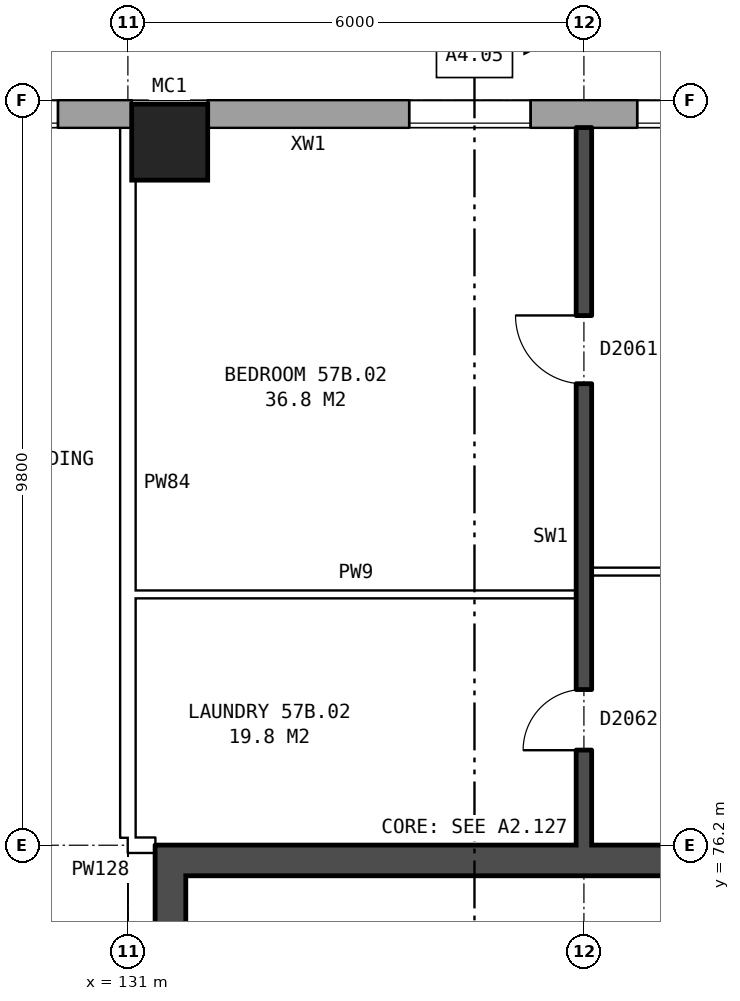
"""IFC4 building model, lengths in metres.
Left out: names, types, materials, properties, quantities, classifications, styles, units other than length and angle.
Written with IfcOpenShell. Run it as: python <this file> out.ifc"""

import sys

from ifc_helpers import new_model, si_unit, direction, frame, frame_2d, origin, origin_2d, place, context, subcontext, project, spatial, rectangle, hollow_rectangle, extrude, element, fill, save


model = new_model("IFC4")
c1 = context("Model", 3, precision=1e-05, world=origin(), true_north=direction((0.0, 1.0)))
c2 = subcontext(c1, "Body", "Model", "MODEL_VIEW")
j1 = project(units=[si_unit("LENGTHUNIT", "METRE"), si_unit("PLANEANGLEUNIT", "RADIAN")], contexts=[c1])
p1 = place(None, origin())
s1 = spatial("IfcSite", under=j1, at=p1, CompositionType="ELEMENT")
p2 = place(p1, origin())
s2 = spatial("IfcBuilding", under=s1, at=p2, CompositionType="ELEMENT")
p3 = place(p2, frame((0.0, 0.0, 202.8)))
s3 = spatial("IfcBuildingStorey", under=s2, at=p3, CompositionType="ELEMENT", Elevation=202.8)
p4 = place(p3, frame((131.55, 85.45, 0.0), z_axis=(0.0, 0.0, 1.0), x_axis=(1.0, 0.0, 0.0)))
e1 = element("IfcColumn", 1, at=p4, inside=s3, PredefinedType="COLUMN", context=c2, shape_type="SweptSolid", body=[
    extrude(hollow_rectangle(XDim=1.0, YDim=1.0, WallThickness=0.055, at=origin_2d()), origin(), (0.0, 0.0, 1.0), 3.1),
])
p5 = place(p3, frame((165.925, 85.82, 0.0), z_axis=(0.0, 0.0, 1.0), x_axis=(-1.0, 0.0, 0.0)))
e2 = element("IfcWall", 2, at=p5, inside=s3, PredefinedType="STANDARD", context=c2, shape_type="SweptSolid", body=[
    extrude(rectangle(XDim=33.875, YDim=0.36, at=frame_2d((16.938, 0.0))), origin(), (0.0, 0.0, 1.0), 2.85),
])
p6 = place(p5, frame((2.625, 0.0, 0.8)))
e3 = element("IfcOpeningElement", 3, at=p6, cuts=e2, PredefinedType="OPENING", context=c2, shape_type="SweptSolid", body=[
    extrude(rectangle(XDim=1.6, YDim=1.8, at=frame_2d((0.8, 0.9))), frame((0.0, 0.19, 0.0), z_axis=(0.0, -1.0, 0.0), x_axis=(1.0, 0.0, 0.0)), (0.0, 0.0, 1.0), 0.38),
])
p7 = place(p5, frame((5.625, 0.0, 0.8)))
e4 = element("IfcOpeningElement", 4, at=p7, cuts=e2, PredefinedType="OPENING", context=c2, shape_type="SweptSolid", body=[
    extrude(rectangle(XDim=1.6, YDim=1.8, at=frame_2d((0.8, 0.9))), frame((0.0, 0.19, 0.0), z_axis=(0.0, -1.0, 0.0), x_axis=(1.0, 0.0, 0.0)), (0.0, 0.0, 1.0), 0.38),
])
p8 = place(p5, frame((8.625, 0.0, 0.8)))
e5 = element("IfcOpeningElement", 5, at=p8, cuts=e2, PredefinedType="OPENING", context=c2, shape_type="SweptSolid", body=[
    extrude(rectangle(XDim=1.6, YDim=1.8, at=frame_2d((0.8, 0.9))), frame((0.0, 0.19, 0.0), z_axis=(0.0, -1.0, 0.0), x_axis=(1.0, 0.0, 0.0)), (0.0, 0.0, 1.0), 0.38),
])
p9 = place(p5, frame((11.625, 0.0, 0.8)))
e6 = element("IfcOpeningElement", 6, at=p9, cuts=e2, PredefinedType="OPENING", context=c2, shape_type="SweptSolid", body=[
    extrude(rectangle(XDim=1.6, YDim=1.8, at=frame_2d((0.8, 0.9))), frame((0.0, 0.19, 0.0), z_axis=(0.0, -1.0, 0.0), x_axis=(1.0, 0.0, 0.0)), (0.0, 0.0, 1.0), 0.38),
])
p10 = place(p5, frame((14.625, 0.0, 0.8)))
e7 = element("IfcOpeningElement", 7, at=p10, cuts=e2, PredefinedType="OPENING", context=c2, shape_type="SweptSolid", body=[
    extrude(rectangle(XDim=1.6, YDim=1.8, at=frame_2d((0.8, 0.9))), frame((0.0, 0.19, 0.0), z_axis=(0.0, -1.0, 0.0), x_axis=(1.0, 0.0, 0.0)), (0.0, 0.0, 1.0), 0.38),
])
p11 = place(p5, frame((17.625, 0.0, 0.8)))
e8 = element("IfcOpeningElement", 8, at=p11, cuts=e2, PredefinedType="OPENING", context=c2, shape_type="SweptSolid", body=[
    extrude(rectangle(XDim=1.6, YDim=1.8, at=frame_2d((0.8, 0.9))), frame((0.0, 0.19, 0.0), z_axis=(0.0, -1.0, 0.0), x_axis=(1.0, 0.0, 0.0)), (0.0, 0.0, 1.0), 0.38),
])
p12 = place(p5, frame((20.625, 0.0, 0.8)))
e9 = element("IfcOpeningElement", 9, at=p12, cuts=e2, PredefinedType="OPENING", context=c2, shape_type="SweptSolid", body=[
    extrude(rectangle(XDim=1.6, YDim=1.8, at=frame_2d((0.8, 0.9))), frame((0.0, 0.19, 0.0), z_axis=(0.0, -1.0, 0.0), x_axis=(1.0, 0.0, 0.0)), (0.0, 0.0, 1.0), 0.38),
])
p13 = place(p5, frame((23.625, 0.0, 0.8)))
e10 = element("IfcOpeningElement", 10, at=p13, cuts=e2, PredefinedType="OPENING", context=c2, shape_type="SweptSolid", body=[
    extrude(rectangle(XDim=1.6, YDim=1.8, at=frame_2d((0.8, 0.9))), frame((0.0, 0.19, 0.0), z_axis=(0.0, -1.0, 0.0), x_axis=(1.0, 0.0, 0.0)), (0.0, 0.0, 1.0), 0.38),
])
p14 = place(p5, frame((26.625, 0.0, 0.8)))
e11 = element("IfcOpeningElement", 11, at=p14, cuts=e2, PredefinedType="OPENING", context=c2, shape_type="SweptSolid", body=[
    extrude(rectangle(XDim=1.6, YDim=1.8, at=frame_2d((0.8, 0.9))), frame((0.0, 0.19, 0.0), z_axis=(0.0, -1.0, 0.0), x_axis=(1.0, 0.0, 0.0)), (0.0, 0.0, 1.0), 0.38),
])
p15 = place(p5, frame((29.625, 0.0, 0.8)))
e12 = element("IfcOpeningElement", 12, at=p15, cuts=e2, PredefinedType="OPENING", context=c2, shape_type="SweptSolid", body=[
    extrude(rectangle(XDim=1.6, YDim=1.8, at=frame_2d((0.8, 0.9))), frame((0.0, 0.19, 0.0), z_axis=(0.0, -1.0, 0.0), x_axis=(1.0, 0.0, 0.0)), (0.0, 0.0, 1.0), 0.38),
])
p16 = place(p3, frame((131.05, 85.82, 0.0), z_axis=(0.0, 0.0, 1.0), x_axis=(-1.0, 0.0, 0.0)))
e13 = element("IfcWall", 13, at=p16, inside=s3, PredefinedType="STANDARD", context=c2, shape_type="SweptSolid", body=[
    extrude(rectangle(XDim=55.1, YDim=0.36, at=frame_2d((27.55, 0.0))), origin(), (0.0, 0.0, 1.0), 2.85),
])
p17 = place(p16, frame((0.969, 0.0, 0.8)))
e14 = element("IfcOpeningElement", 14, at=p17, cuts=e13, PredefinedType="OPENING", context=c2, shape_type="SweptSolid", body=[
    extrude(rectangle(XDim=1.6, YDim=1.8, at=frame_2d((0.8, 0.9))), frame((0.0, 0.19, 0.0), z_axis=(0.0, -1.0, 0.0), x_axis=(1.0, 0.0, 0.0)), (0.0, 0.0, 1.0), 0.38),
])
p18 = place(p16, frame((4.406, 0.0, 0.8)))
e15 = element("IfcOpeningElement", 15, at=p18, cuts=e13, PredefinedType="OPENING", context=c2, shape_type="SweptSolid", body=[
    extrude(rectangle(XDim=1.6, YDim=1.8, at=frame_2d((0.8, 0.9))), frame((0.0, 0.19, 0.0), z_axis=(0.0, -1.0, 0.0), x_axis=(1.0, 0.0, 0.0)), (0.0, 0.0, 1.0), 0.38),
])
p19 = place(p16, frame((7.844, 0.0, 0.8)))
e16 = element("IfcOpeningElement", 16, at=p19, cuts=e13, PredefinedType="OPENING", context=c2, shape_type="SweptSolid", body=[
    extrude(rectangle(XDim=1.6, YDim=1.8, at=frame_2d((0.8, 0.9))), frame((0.0, 0.19, 0.0), z_axis=(0.0, -1.0, 0.0), x_axis=(1.0, 0.0, 0.0)), (0.0, 0.0, 1.0), 0.38),
])
p20 = place(p16, frame((11.281, 0.0, 0.8)))
e17 = element("IfcOpeningElement", 17, at=p20, cuts=e13, PredefinedType="OPENING", context=c2, shape_type="SweptSolid", body=[
    extrude(rectangle(XDim=1.6, YDim=1.8, at=frame_2d((0.8, 0.9))), frame((0.0, 0.19, 0.0), z_axis=(0.0, -1.0, 0.0), x_axis=(1.0, 0.0, 0.0)), (0.0, 0.0, 1.0), 0.38),
])
p21 = place(p16, frame((14.719, 0.0, 0.8)))
e18 = element("IfcOpeningElement", 18, at=p21, cuts=e13, PredefinedType="OPENING", context=c2, shape_type="SweptSolid", body=[
    extrude(rectangle(XDim=1.6, YDim=1.8, at=frame_2d((0.8, 0.9))), frame((0.0, 0.19, 0.0), z_axis=(0.0, -1.0, 0.0), x_axis=(1.0, 0.0, 0.0)), (0.0, 0.0, 1.0), 0.38),
])
p22 = place(p16, frame((18.156, 0.0, 0.8)))
e19 = element("IfcOpeningElement", 19, at=p22, cuts=e13, PredefinedType="OPENING", context=c2, shape_type="SweptSolid", body=[
    extrude(rectangle(XDim=1.6, YDim=1.8, at=frame_2d((0.8, 0.9))), frame((0.0, 0.19, 0.0), z_axis=(0.0, -1.0, 0.0), x_axis=(1.0, 0.0, 0.0)), (0.0, 0.0, 1.0), 0.38),
])
p23 = place(p16, frame((21.594, 0.0, 0.8)))
e20 = element("IfcOpeningElement", 20, at=p23, cuts=e13, PredefinedType="OPENING", context=c2, shape_type="SweptSolid", body=[
    extrude(rectangle(XDim=1.6, YDim=1.8, at=frame_2d((0.8, 0.9))), frame((0.0, 0.19, 0.0), z_axis=(0.0, -1.0, 0.0), x_axis=(1.0, 0.0, 0.0)), (0.0, 0.0, 1.0), 0.38),
])
p24 = place(p16, frame((25.031, 0.0, 0.8)))
e21 = element("IfcOpeningElement", 21, at=p24, cuts=e13, PredefinedType="OPENING", context=c2, shape_type="SweptSolid", body=[
    extrude(rectangle(XDim=1.6, YDim=1.8, at=frame_2d((0.8, 0.9))), frame((0.0, 0.19, 0.0), z_axis=(0.0, -1.0, 0.0), x_axis=(1.0, 0.0, 0.0)), (0.0, 0.0, 1.0), 0.38),
])
p25 = place(p16, frame((28.469, 0.0, 0.8)))
e22 = element("IfcOpeningElement", 22, at=p25, cuts=e13, PredefinedType="OPENING", context=c2, shape_type="SweptSolid", body=[
    extrude(rectangle(XDim=1.6, YDim=1.8, at=frame_2d((0.8, 0.9))), frame((0.0, 0.19, 0.0), z_axis=(0.0, -1.0, 0.0), x_axis=(1.0, 0.0, 0.0)), (0.0, 0.0, 1.0), 0.38),
])
p26 = place(p16, frame((31.906, 0.0, 0.8)))
e23 = element("IfcOpeningElement", 23, at=p26, cuts=e13, PredefinedType="OPENING", context=c2, shape_type="SweptSolid", body=[
    extrude(rectangle(XDim=1.6, YDim=1.8, at=frame_2d((0.8, 0.9))), frame((0.0, 0.19, 0.0), z_axis=(0.0, -1.0, 0.0), x_axis=(1.0, 0.0, 0.0)), (0.0, 0.0, 1.0), 0.38),
])
p27 = place(p16, frame((35.344, 0.0, 0.8)))
e24 = element("IfcOpeningElement", 24, at=p27, cuts=e13, PredefinedType="OPENING", context=c2, shape_type="SweptSolid", body=[
    extrude(rectangle(XDim=1.6, YDim=1.8, at=frame_2d((0.8, 0.9))), frame((0.0, 0.19, 0.0), z_axis=(0.0, -1.0, 0.0), x_axis=(1.0, 0.0, 0.0)), (0.0, 0.0, 1.0), 0.38),
])
p28 = place(p16, frame((38.781, 0.0, 0.8)))
e25 = element("IfcOpeningElement", 25, at=p28, cuts=e13, PredefinedType="OPENING", context=c2, shape_type="SweptSolid", body=[
    extrude(rectangle(XDim=1.6, YDim=1.8, at=frame_2d((0.8, 0.9))), frame((0.0, 0.19, 0.0), z_axis=(0.0, -1.0, 0.0), x_axis=(1.0, 0.0, 0.0)), (0.0, 0.0, 1.0), 0.38),
])
p29 = place(p16, frame((42.219, 0.0, 0.8)))
e26 = element("IfcOpeningElement", 26, at=p29, cuts=e13, PredefinedType="OPENING", context=c2, shape_type="SweptSolid", body=[
    extrude(rectangle(XDim=1.6, YDim=1.8, at=frame_2d((0.8, 0.9))), frame((0.0, 0.19, 0.0), z_axis=(0.0, -1.0, 0.0), x_axis=(1.0, 0.0, 0.0)), (0.0, 0.0, 1.0), 0.38),
])
p30 = place(p16, frame((45.656, 0.0, 0.8)))
e27 = element("IfcOpeningElement", 27, at=p30, cuts=e13, PredefinedType="OPENING", context=c2, shape_type="SweptSolid", body=[
    extrude(rectangle(XDim=1.6, YDim=1.8, at=frame_2d((0.8, 0.9))), frame((0.0, 0.19, 0.0), z_axis=(0.0, -1.0, 0.0), x_axis=(1.0, 0.0, 0.0)), (0.0, 0.0, 1.0), 0.38),
])
p31 = place(p16, frame((49.094, 0.0, 0.8)))
e28 = element("IfcOpeningElement", 28, at=p31, cuts=e13, PredefinedType="OPENING", context=c2, shape_type="SweptSolid", body=[
    extrude(rectangle(XDim=1.6, YDim=1.8, at=frame_2d((0.8, 0.9))), frame((0.0, 0.19, 0.0), z_axis=(0.0, -1.0, 0.0), x_axis=(1.0, 0.0, 0.0)), (0.0, 0.0, 1.0), 0.38),
])
p32 = place(p16, frame((52.531, 0.0, 0.8)))
e29 = element("IfcOpeningElement", 29, at=p32, cuts=e13, PredefinedType="OPENING", context=c2, shape_type="SweptSolid", body=[
    extrude(rectangle(XDim=1.6, YDim=1.8, at=frame_2d((0.8, 0.9))), frame((0.0, 0.19, 0.0), z_axis=(0.0, -1.0, 0.0), x_axis=(1.0, 0.0, 0.0)), (0.0, 0.0, 1.0), 0.38),
])
p33 = place(p3, frame((131.56, 63.8, 0.0), z_axis=(0.0, 0.0, 1.0), x_axis=(0.0, 1.0, 0.0)))
e30 = element("IfcWall", 30, at=p33, inside=s3, PredefinedType="SHEAR", context=c2, shape_type="SweptSolid", body=[
    extrude(rectangle(XDim=12.4, YDim=0.4, at=frame_2d((6.2, 0.0))), origin(), (0.0, 0.0, 1.0), 2.85),
])
p34 = place(p33, frame((9.8, 0.0, 0.0)))
e31 = element("IfcOpeningElement", 31, at=p34, cuts=e30, PredefinedType="OPENING", context=c2, shape_type="SweptSolid", body=[
    extrude(rectangle(XDim=1.1, YDim=2.1, at=frame_2d((0.55, 1.05))), frame((0.0, 0.21, 0.0), z_axis=(0.0, -1.0, 0.0), x_axis=(1.0, 0.0, 0.0)), (0.0, 0.0, 1.0), 0.42),
])
p35 = place(p3, frame((139.36, 76.0, 0.0), z_axis=(0.0, 0.0, 1.0), x_axis=(-1.0, 0.0, 0.0)))
e32 = element("IfcWall", 32, at=p35, inside=s3, PredefinedType="SHEAR", context=c2, shape_type="SweptSolid", body=[
    extrude(rectangle(XDim=7.6, YDim=0.4, at=frame_2d((3.8, 0.0))), origin(), (0.0, 0.0, 1.0), 2.85),
])
p36 = place(p3, frame((131.0, 76.2, 0.0), z_axis=(0.0, 0.0, 1.0), x_axis=(1.0, 0.0, 0.0)))
e33 = element("IfcWall", 33, at=p36, inside=s3, PredefinedType="PARTITIONING", context=c2, shape_type="SweptSolid", body=[
    extrude(rectangle(XDim=0.36, YDim=0.2, at=frame_2d((0.18, 0.0))), origin(), (0.0, 0.0, 1.0), 2.85),
])
p37 = place(p3, frame((131.1, 79.5, 0.0), z_axis=(0.0, 0.0, 1.0), x_axis=(1.0, 0.0, 0.0)))
e34 = element("IfcWall", 34, at=p37, inside=s3, PredefinedType="PARTITIONING", context=c2, shape_type="SweptSolid", body=[
    extrude(rectangle(XDim=5.8, YDim=0.1, at=frame_2d((2.9, 0.0))), origin(), (0.0, 0.0, 1.0), 2.85),
])
p38 = place(p3, frame((137.1, 79.8, 0.0), z_axis=(0.0, 0.0, 1.0), x_axis=(1.0, 0.0, 0.0)))
e35 = element("IfcWall", 35, at=p38, inside=s3, PredefinedType="PARTITIONING", context=c2, shape_type="SweptSolid", body=[
    extrude(rectangle(XDim=5.8, YDim=0.1, at=frame_2d((2.9, 0.0))), origin(), (0.0, 0.0, 1.0), 2.85),
])
p39 = place(p38, frame((1.3, 0.0, 0.0)))
e36 = element("IfcOpeningElement", 36, at=p39, cuts=e35, PredefinedType="OPENING", context=c2, shape_type="SweptSolid", body=[
    extrude(rectangle(XDim=0.9, YDim=2.1, at=frame_2d((0.45, 1.05))), frame((0.0, 0.06, 0.0), z_axis=(0.0, -1.0, 0.0), x_axis=(1.0, 0.0, 0.0)), (0.0, 0.0, 1.0), 0.12),
])
p40 = place(p38, frame((4.2, 0.0, 0.0)))
e37 = element("IfcOpeningElement", 37, at=p40, cuts=e35, PredefinedType="OPENING", context=c2, shape_type="SweptSolid", body=[
    extrude(rectangle(XDim=0.9, YDim=2.1, at=frame_2d((0.45, 1.05))), frame((0.0, 0.06, 0.0), z_axis=(0.0, -1.0, 0.0), x_axis=(1.0, 0.0, 0.0)), (0.0, 0.0, 1.0), 0.12),
])
p41 = place(p3, frame((131.0, 76.3, 0.0), z_axis=(0.0, 0.0, 1.0), x_axis=(0.0, 1.0, 0.0)))
e38 = element("IfcWall", 38, at=p41, inside=s3, PredefinedType="PARTITIONING", context=c2, shape_type="SweptSolid", body=[
    extrude(rectangle(XDim=9.34, YDim=0.2, at=frame_2d((4.67, 0.0))), origin(), (0.0, 0.0, 1.0), 2.85),
])
p42 = place(p3, frame((137.0, 76.2, 0.0), z_axis=(0.0, 0.0, 1.0), x_axis=(0.0, 1.0, 0.0)))
e39 = element("IfcWall", 39, at=p42, inside=s3, PredefinedType="SOLIDWALL", context=c2, shape_type="SweptSolid", body=[
    extrude(rectangle(XDim=9.44, YDim=0.2, at=frame_2d((4.72, 0.0))), origin(), (0.0, 0.0, 1.0), 2.85),
])
p43 = place(p42, frame((6.07, 0.0, 0.0)))
e40 = element("IfcOpeningElement", 40, at=p43, cuts=e39, PredefinedType="OPENING", context=c2, shape_type="SweptSolid", body=[
    extrude(rectangle(XDim=0.9, YDim=2.1, at=frame_2d((0.45, 1.05))), frame((0.0, 0.11, 0.0), z_axis=(0.0, -1.0, 0.0), x_axis=(1.0, 0.0, 0.0)), (0.0, 0.0, 1.0), 0.22),
])
p44 = place(p42, frame((1.25, 0.0, 0.0)))
e41 = element("IfcOpeningElement", 41, at=p44, cuts=e39, PredefinedType="OPENING", context=c2, shape_type="SweptSolid", body=[
    extrude(rectangle(XDim=0.8, YDim=2.1, at=frame_2d((0.4, 1.05))), frame((0.0, 0.11, 0.0), z_axis=(0.0, -1.0, 0.0), x_axis=(1.0, 0.0, 0.0)), (0.0, 0.0, 1.0), 0.22),
])
p45 = place(p14, origin())
e42 = element("IfcWindow", 42, at=p45, inside=s3, PartitioningType="SINGLE_PANEL", PredefinedType="WINDOW", context=c2, shape_type="SweptSolid", body=[
    extrude(rectangle(XDim=1.6, YDim=1.8, at=frame_2d((0.8, 0.9))), frame((0.0, 0.15, 0.0), z_axis=(0.0, -1.0, 0.0), x_axis=(1.0, 0.0, 0.0)), (0.0, 0.0, 1.0), 0.06),
])
fill(e11, e42)
p46 = place(p15, origin())
e43 = element("IfcWindow", 43, at=p46, inside=s3, PartitioningType="SINGLE_PANEL", PredefinedType="WINDOW", context=c2, shape_type="SweptSolid", body=[
    extrude(rectangle(XDim=1.6, YDim=1.8, at=frame_2d((0.8, 0.9))), frame((0.0, 0.15, 0.0), z_axis=(0.0, -1.0, 0.0), x_axis=(1.0, 0.0, 0.0)), (0.0, 0.0, 1.0), 0.06),
])
fill(e12, e43)
p47 = place(p17, origin())
e44 = element("IfcWindow", 44, at=p47, inside=s3, PartitioningType="SINGLE_PANEL", PredefinedType="WINDOW", context=c2, shape_type="SweptSolid", body=[
    extrude(rectangle(XDim=1.6, YDim=1.8, at=frame_2d((0.8, 0.9))), frame((0.0, 0.15, 0.0), z_axis=(0.0, -1.0, 0.0), x_axis=(1.0, 0.0, 0.0)), (0.0, 0.0, 1.0), 0.06),
])
fill(e14, e44)
p48 = place(p43, origin())
e45 = element("IfcDoor", 45, at=p48, inside=s3, OperationType="SINGLE_SWING_RIGHT", PredefinedType="DOOR", context=c2, shape_type="SweptSolid", body=[
    extrude(rectangle(XDim=0.9, YDim=2.1, at=frame_2d((0.45, 1.05))), frame((0.0, 0.025, 0.0), z_axis=(0.0, -1.0, 0.0), x_axis=(1.0, 0.0, 0.0)), (0.0, 0.0, 1.0), 0.05),
])
fill(e40, e45)
p49 = place(p44, origin())
e46 = element("IfcDoor", 46, at=p49, inside=s3, OperationType="SINGLE_SWING_LEFT", PredefinedType="DOOR", context=c2, shape_type="SweptSolid", body=[
    extrude(rectangle(XDim=0.8, YDim=2.1, at=frame_2d((0.4, 1.05))), frame((0.0, 0.025, 0.0), z_axis=(0.0, -1.0, 0.0), x_axis=(1.0, 0.0, 0.0)), (0.0, 0.0, 1.0), 0.05),
])
fill(e41, e46)
save(model, sys.argv[1])
